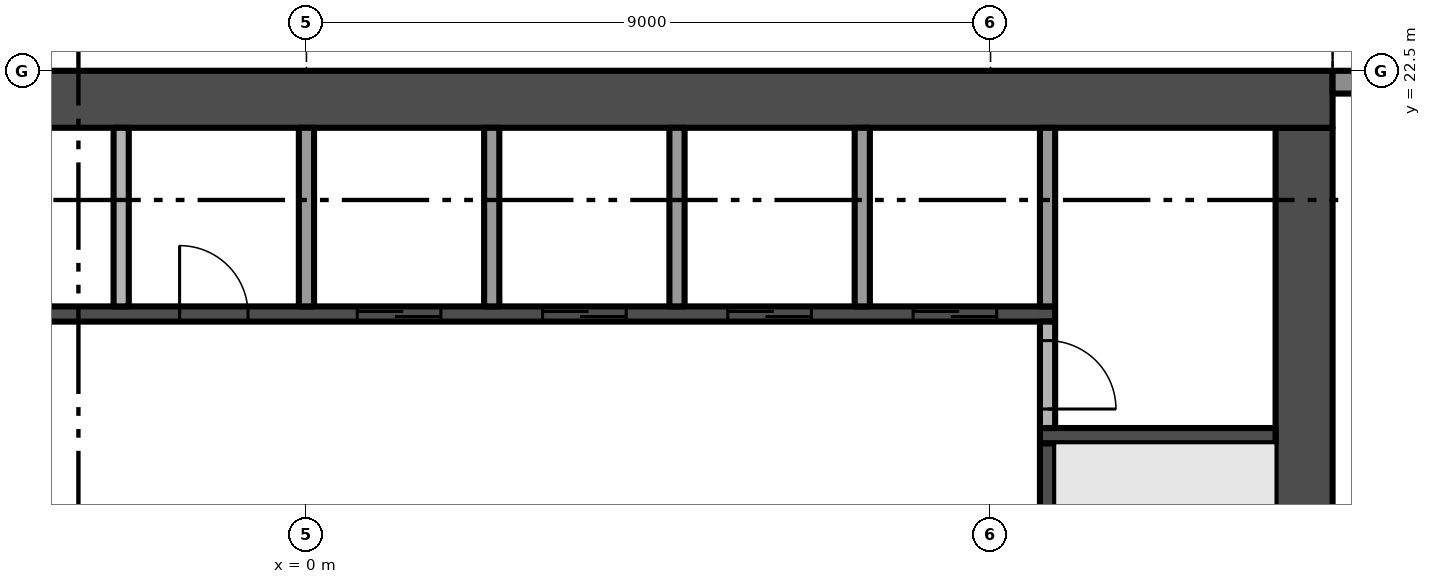
"""IFC4 building model, lengths in metres.
Left out: names, types, materials, properties, quantities, classifications, styles, units other than length and angle.
Written with IfcOpenShell. Run it as: python <this file> out.ifc"""

import sys

from ifc_helpers import new_model, si_unit, direction, frame, frame_2d, origin, place, context, subcontext, project, spatial, rectangle, extrude, element, fill, save


model = new_model("IFC4")
c1 = context("Model", 3, precision=1e-05, world=origin(), true_north=direction((0.0, 1.0)))
c2 = subcontext(c1, "Body", "Model", "MODEL_VIEW")
j1 = project(units=[si_unit("LENGTHUNIT", "METRE"), si_unit("PLANEANGLEUNIT", "RADIAN")], contexts=[c1])
p1 = place(None, origin())
s1 = spatial("IfcSite", under=j1, at=p1, CompositionType="ELEMENT")
p2 = place(p1, origin())
s2 = spatial("IfcBuilding", under=s1, at=p2, CompositionType="ELEMENT")
p3 = place(p2, frame((0.0, 0.0, 147.8)))
s3 = spatial("IfcBuildingStorey", under=s2, at=p3, CompositionType="ELEMENT", Elevation=147.8)
p4 = place(p3, frame((13.125, 5.25, -0.3), z_axis=(0.0, 0.0, 1.0), x_axis=(0.0, 1.0, 0.0)))
e1 = element("IfcWall", 1, at=p4, inside=s3, PredefinedType="SHEAR", context=c2, shape_type="SweptSolid", body=[
    extrude(rectangle(XDim=16.5, YDim=0.75, at=frame_2d((8.25, 0.0))), origin(), (0.0, 0.0, 1.0), 3.8),
])
p5 = place(p4, frame((6.15, 0.0, 0.3)))
e2 = element("IfcOpeningElement", 2, at=p5, cuts=e1, PredefinedType="OPENING", context=c2, shape_type="SweptSolid", body=[
    extrude(rectangle(XDim=1.2, YDim=2.2, at=frame_2d((0.6, 1.1))), frame((0.0, 0.385, 0.0), z_axis=(0.0, -1.0, 0.0), x_axis=(1.0, 0.0, 0.0)), (0.0, 0.0, 1.0), 0.77),
])
p6 = place(p3, frame((13.5, 22.125, -0.3), z_axis=(0.0, 0.0, 1.0), x_axis=(-1.0, 0.0, 0.0)))
e3 = element("IfcWall", 3, at=p6, inside=s3, PredefinedType="SHEAR", context=c2, shape_type="SweptSolid", body=[
    extrude(rectangle(XDim=27.0, YDim=0.75, at=frame_2d((13.5, 0.0))), origin(), (0.0, 0.0, 1.0), 3.8),
])
p7 = place(p3, frame((13.5, 22.35, 0.0), z_axis=(0.0, 0.0, 1.0), x_axis=(1.0, 0.0, 0.0)))
e4 = element("IfcWall", 4, at=p7, inside=s3, PredefinedType="SOLIDWALL", context=c2, shape_type="SweptSolid", body=[
    extrude(rectangle(XDim=3.35, YDim=0.3, at=frame_2d((1.675, 0.0))), origin(), (0.0, 0.0, 1.0), 3.5),
])
p8 = place(p7, frame((0.7, 0.0, 0.0)))
e5 = element("IfcOpeningElement", 5, at=p8, cuts=e4, PredefinedType="OPENING", context=c2, shape_type="SweptSolid", body=[
    extrude(rectangle(XDim=2.35, YDim=2.4, at=frame_2d((1.175, 1.2))), frame((0.0, 0.16, 0.0), z_axis=(0.0, -1.0, 0.0), x_axis=(1.0, 0.0, 0.0)), (0.0, 0.0, 1.0), 0.32),
])
p9 = place(p3, frame((-9.85, 19.3, 0.0), z_axis=(0.0, 0.0, 1.0), x_axis=(1.0, 0.0, 0.0)))
e6 = element("IfcWall", 6, at=p9, inside=s3, PredefinedType="SHEAR", context=c2, shape_type="SweptSolid", body=[
    extrude(rectangle(XDim=19.7, YDim=0.2, at=frame_2d((9.85, 0.0))), origin(), (0.0, 0.0, 1.0), 3.5),
])
p10 = place(p9, frame((10.519, 0.0, 0.0)))
e7 = element("IfcOpeningElement", 7, at=p10, cuts=e6, PredefinedType="OPENING", context=c2, shape_type="SweptSolid", body=[
    extrude(rectangle(XDim=1.1, YDim=2.1, at=frame_2d((0.55, 1.05))), frame((0.0, 0.11, 0.0), z_axis=(0.0, -1.0, 0.0), x_axis=(1.0, 0.0, 0.0)), (0.0, 0.0, 1.0), 0.22),
])
p11 = place(p9, frame((12.956, 0.0, 0.0)))
e8 = element("IfcOpeningElement", 8, at=p11, cuts=e6, PredefinedType="OPENING", context=c2, shape_type="SweptSolid", body=[
    extrude(rectangle(XDim=1.1, YDim=2.1, at=frame_2d((0.55, 1.05))), frame((0.0, 0.11, 0.0), z_axis=(0.0, -1.0, 0.0), x_axis=(1.0, 0.0, 0.0)), (0.0, 0.0, 1.0), 0.22),
])
p12 = place(p9, frame((15.394, 0.0, 0.0)))
e9 = element("IfcOpeningElement", 9, at=p12, cuts=e6, PredefinedType="OPENING", context=c2, shape_type="SweptSolid", body=[
    extrude(rectangle(XDim=1.1, YDim=2.1, at=frame_2d((0.55, 1.05))), frame((0.0, 0.11, 0.0), z_axis=(0.0, -1.0, 0.0), x_axis=(1.0, 0.0, 0.0)), (0.0, 0.0, 1.0), 0.22),
])
p13 = place(p9, frame((17.831, 0.0, 0.0)))
e10 = element("IfcOpeningElement", 10, at=p13, cuts=e6, PredefinedType="OPENING", context=c2, shape_type="SweptSolid", body=[
    extrude(rectangle(XDim=1.1, YDim=2.1, at=frame_2d((0.55, 1.05))), frame((0.0, 0.11, 0.0), z_axis=(0.0, -1.0, 0.0), x_axis=(1.0, 0.0, 0.0)), (0.0, 0.0, 1.0), 0.22),
])
p14 = place(p9, frame((0.869, 0.0, 0.0)))
e11 = element("IfcOpeningElement", 11, at=p14, cuts=e6, PredefinedType="OPENING", context=c2, shape_type="SweptSolid", body=[
    extrude(rectangle(XDim=0.9, YDim=2.1, at=frame_2d((0.45, 1.05))), frame((0.0, 0.11, 0.0), z_axis=(0.0, -1.0, 0.0), x_axis=(1.0, 0.0, 0.0)), (0.0, 0.0, 1.0), 0.22),
])
p15 = place(p9, frame((4.525, 0.0, 0.0)))
e12 = element("IfcOpeningElement", 12, at=p15, cuts=e6, PredefinedType="OPENING", context=c2, shape_type="SweptSolid", body=[
    extrude(rectangle(XDim=0.9, YDim=2.1, at=frame_2d((0.45, 1.05))), frame((0.0, 0.11, 0.0), z_axis=(0.0, -1.0, 0.0), x_axis=(1.0, 0.0, 0.0)), (0.0, 0.0, 1.0), 0.22),
])
p16 = place(p9, frame((8.181, 0.0, 0.0)))
e13 = element("IfcOpeningElement", 13, at=p16, cuts=e6, PredefinedType="OPENING", context=c2, shape_type="SweptSolid", body=[
    extrude(rectangle(XDim=0.9, YDim=2.1, at=frame_2d((0.45, 1.05))), frame((0.0, 0.11, 0.0), z_axis=(0.0, -1.0, 0.0), x_axis=(1.0, 0.0, 0.0)), (0.0, 0.0, 1.0), 0.22),
])
for number, where, z_axis, x_axis in (
    (14, (-2.438, 19.4, 0.0), (0.0, 0.0, 1.0), (0.0, 1.0, 0.0)),
    (15, (0.0, 19.4, 0.0), (0.0, 0.0, 1.0), (0.0, 1.0, 0.0)),
    (16, (2.438, 19.4, 0.0), (0.0, 0.0, 1.0), (0.0, 1.0, 0.0)),
    (17, (4.875, 19.4, 0.0), (0.0, 0.0, 1.0), (0.0, 1.0, 0.0)),
    (18, (7.312, 19.4, 0.0), (0.0, 0.0, 1.0), (0.0, 1.0, 0.0)),
):
    element("IfcWall", number, at=place(p3, frame(where, z_axis=z_axis, x_axis=x_axis)), inside=s3, PredefinedType="PARTITIONING", context=c2, shape_type="SweptSolid", body=[
        extrude(rectangle(XDim=2.35, YDim=0.2, at=frame_2d((1.175, 0.0))), origin(), (0.0, 0.0, 1.0), 3.5),
    ])
p17 = place(p3, frame((9.75, 16.1, 0.0), z_axis=(0.0, 0.0, 1.0), x_axis=(0.0, 1.0, 0.0)))
e19 = element("IfcWall", 19, at=p17, inside=s3, PredefinedType="SHEAR", context=c2, shape_type="SweptSolid", body=[
    extrude(rectangle(XDim=1.5, YDim=0.2, at=frame_2d((0.75, 0.0))), origin(), (0.0, 0.0, 1.0), 3.5),
])
p18 = place(p3, frame((9.65, 17.7, 0.0), z_axis=(0.0, 0.0, 1.0), x_axis=(1.0, 0.0, 0.0)))
e20 = element("IfcWall", 20, at=p18, inside=s3, PredefinedType="SHEAR", context=c2, shape_type="SweptSolid", body=[
    extrude(rectangle(XDim=3.1, YDim=0.2, at=frame_2d((1.55, 0.0))), origin(), (0.0, 0.0, 1.0), 3.5),
])
p19 = place(p3, frame((9.75, 19.2, 0.0), z_axis=(0.0, 0.0, 1.0), x_axis=(0.0, -1.0, 0.0)))
e21 = element("IfcWall", 21, at=p19, inside=s3, PredefinedType="PARTITIONING", context=c2, shape_type="SweptSolid", body=[
    extrude(rectangle(XDim=1.4, YDim=0.2, at=frame_2d((0.7, 0.0))), origin(), (0.0, 0.0, 1.0), 3.5),
])
p20 = place(p19, frame((0.25, 0.0, 0.0)))
e22 = element("IfcOpeningElement", 22, at=p20, cuts=e21, PredefinedType="OPENING", context=c2, shape_type="SweptSolid", body=[
    extrude(rectangle(XDim=0.9, YDim=2.1, at=frame_2d((0.45, 1.05))), frame((0.0, 0.11, 0.0), z_axis=(0.0, -1.0, 0.0), x_axis=(1.0, 0.0, 0.0)), (0.0, 0.0, 1.0), 0.22),
])
p21 = place(p3, frame((9.75, 19.4, 0.0), z_axis=(0.0, 0.0, 1.0), x_axis=(0.0, 1.0, 0.0)))
e23 = element("IfcWall", 23, at=p21, inside=s3, PredefinedType="PARTITIONING", context=c2, shape_type="SweptSolid", body=[
    extrude(rectangle(XDim=2.35, YDim=0.2, at=frame_2d((1.175, 0.0))), origin(), (0.0, 0.0, 1.0), 3.5),
])
p22 = place(p10, origin())
e24 = element("IfcDoor", 24, at=p22, inside=s3, OperationType="SLIDING_TO_RIGHT", PredefinedType="DOOR", context=c2, shape_type="SweptSolid", body=[
    extrude(rectangle(XDim=1.1, YDim=2.1, at=frame_2d((0.55, 1.05))), frame((0.0, 0.025, 0.0), z_axis=(0.0, -1.0, 0.0), x_axis=(1.0, 0.0, 0.0)), (0.0, 0.0, 1.0), 0.05),
])
fill(e7, e24)
p23 = place(p11, origin())
e25 = element("IfcDoor", 25, at=p23, inside=s3, OperationType="SLIDING_TO_RIGHT", PredefinedType="DOOR", context=c2, shape_type="SweptSolid", body=[
    extrude(rectangle(XDim=1.1, YDim=2.1, at=frame_2d((0.55, 1.05))), frame((0.0, 0.025, 0.0), z_axis=(0.0, -1.0, 0.0), x_axis=(1.0, 0.0, 0.0)), (0.0, 0.0, 1.0), 0.05),
])
fill(e8, e25)
p24 = place(p12, origin())
e26 = element("IfcDoor", 26, at=p24, inside=s3, OperationType="SLIDING_TO_RIGHT", PredefinedType="DOOR", context=c2, shape_type="SweptSolid", body=[
    extrude(rectangle(XDim=1.1, YDim=2.1, at=frame_2d((0.55, 1.05))), frame((0.0, 0.025, 0.0), z_axis=(0.0, -1.0, 0.0), x_axis=(1.0, 0.0, 0.0)), (0.0, 0.0, 1.0), 0.05),
])
fill(e9, e26)
p25 = place(p13, origin())
e27 = element("IfcDoor", 27, at=p25, inside=s3, OperationType="SLIDING_TO_RIGHT", PredefinedType="DOOR", context=c2, shape_type="SweptSolid", body=[
    extrude(rectangle(XDim=1.1, YDim=2.1, at=frame_2d((0.55, 1.05))), frame((0.0, 0.025, 0.0), z_axis=(0.0, -1.0, 0.0), x_axis=(1.0, 0.0, 0.0)), (0.0, 0.0, 1.0), 0.05),
])
fill(e10, e27)
p26 = place(p20, origin())
e28 = element("IfcDoor", 28, at=p26, inside=s3, OperationType="SINGLE_SWING_RIGHT", PredefinedType="DOOR", context=c2, shape_type="SweptSolid", body=[
    extrude(rectangle(XDim=0.9, YDim=2.1, at=frame_2d((0.45, 1.05))), frame((0.0, 0.025, 0.0), z_axis=(0.0, -1.0, 0.0), x_axis=(1.0, 0.0, 0.0)), (0.0, 0.0, 1.0), 0.05),
])
fill(e22, e28)
p27 = place(p16, origin())
e29 = element("IfcDoor", 29, at=p27, inside=s3, OperationType="SINGLE_SWING_LEFT", PredefinedType="DOOR", context=c2, shape_type="SweptSolid", body=[
    extrude(rectangle(XDim=0.9, YDim=2.1, at=frame_2d((0.45, 1.05))), frame((0.0, 0.025, 0.0), z_axis=(0.0, -1.0, 0.0), x_axis=(1.0, 0.0, 0.0)), (0.0, 0.0, 1.0), 0.05),
])
fill(e13, e29)
save(model, sys.argv[1])
